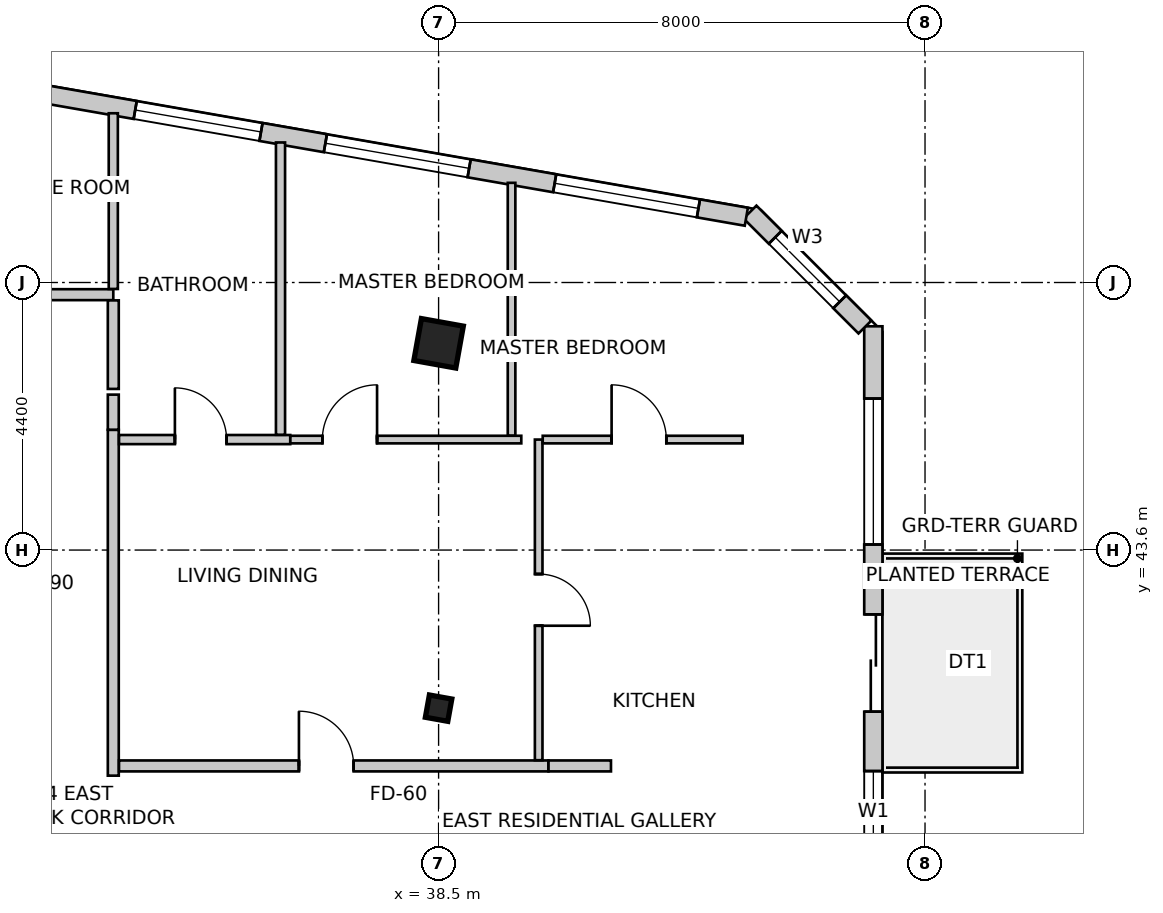
"""IFC4 building model, lengths in metres.
Left out: names, types, materials, properties, quantities, classifications, styles, units other than length and angle.
Written with IfcOpenShell. Run it as: python <this file> out.ifc"""

import sys

from ifc_helpers import new_model, si_unit, direction, frame, frame_2d, origin, origin_2d, place, context, subcontext, project, spatial, rectangle, i_section, extrude, source, transform, mapped, element, fill, save


model = new_model("IFC4")
c1 = context("Model", 3, precision=1e-05, world=origin(), true_north=direction((0.0, 1.0)))
c2 = subcontext(c1, "Body", "Model", "MODEL_VIEW")
j1 = project(units=[si_unit("LENGTHUNIT", "METRE"), si_unit("PLANEANGLEUNIT", "RADIAN")], contexts=[c1])
p1 = place(None, origin())
s1 = spatial("IfcSite", under=j1, at=p1, CompositionType="ELEMENT")
p2 = place(p1, origin())
s2 = spatial("IfcBuilding", under=s1, at=p2, CompositionType="ELEMENT")
p3 = place(p2, frame((0.0, 0.0, 214.9)))
s3 = spatial("IfcBuildingStorey", under=s2, at=p3, CompositionType="ELEMENT", Elevation=214.9)
m1 = source(origin(), c2, "Body", "SweptSolid", [
    extrude(rectangle(XDim=0.7, YDim=0.7, at=origin_2d()), origin(), (0.0, 0.0, 1.0), 3.5),
])
p4 = place(p3, frame((38.5, 47.0, 0.0), z_axis=(0.0, 0.0, 1.0), x_axis=(0.984195607969, -0.17708474032, 0.0)))
e1 = element("IfcColumn", 1, at=p4, inside=s3, PredefinedType="COLUMN", context=c2, shape_type="MappedRepresentation", body=[
    mapped(m1, transform((0.0, 0.0, 0.0), scale=1.0)),
])
m2 = source(origin(), c2, "Body", "SweptSolid", [
    extrude(i_section(OverallWidth=0.374, OverallDepth=0.372, WebThickness=0.016, FlangeThickness=0.026, FilletRadius=0.015, at=origin_2d()), origin(), (0.0, 0.0, 1.0), 3.5),
])
p5 = place(p3, frame((38.5, 41.0, 0.0), z_axis=(0.0, 0.0, 1.0), x_axis=(0.984195607969, -0.17708474032, 0.0)))
e2 = element("IfcColumn", 2, at=p5, inside=s3, PredefinedType="COLUMN", context=c2, shape_type="MappedRepresentation", body=[
    mapped(m2, transform((0.0, 0.0, 0.0), scale=1.0)),
])
p6 = place(p3, frame((45.65, 36.549, 0.0), z_axis=(0.0, 0.0, 1.0), x_axis=(0.0, 1.0, 0.0)))
e3 = element("IfcWall", 3, at=p6, inside=s3, PredefinedType="SOLIDWALL", context=c2, shape_type="SweptSolid", body=[
    extrude(rectangle(XDim=10.73, YDim=0.3, at=frame_2d((5.365, 0.0))), origin(), (0.0, 0.0, 1.0), 3.25),
])
m3 = source(origin(), c2, "Body", "SweptSolid", [
    extrude(rectangle(XDim=1.6, YDim=2.15, at=frame_2d((0.8, 1.075))), frame((0.0, 0.16, 0.0), z_axis=(0.0, -1.0, 0.0), x_axis=(1.0, 0.0, 0.0)), (0.0, 0.0, 1.0), 0.32),
])
p7 = place(p6, frame((4.393, 0.0, 0.0)))
e4 = element("IfcOpeningElement", 4, at=p7, cuts=e3, PredefinedType="OPENING", context=c2, shape_type="MappedRepresentation", body=[
    mapped(m3, transform((0.0, 0.0, 0.0), scale=1.0)),
])
m4 = source(origin(), c2, "Body", "SweptSolid", [
    extrude(rectangle(XDim=2.4, YDim=2.2, at=frame_2d((1.2, 1.1))), frame((0.0, 0.16, 0.0), z_axis=(0.0, -1.0, 0.0), x_axis=(1.0, 0.0, 0.0)), (0.0, 0.0, 1.0), 0.32),
])
p8 = place(p6, frame((1.016, 0.0, 0.85)))
e5 = element("IfcOpeningElement", 5, at=p8, cuts=e3, PredefinedType="OPENING", context=c2, shape_type="MappedRepresentation", body=[
    mapped(m4, transform((0.0, 0.0, 0.0), scale=1.0)),
])
p9 = place(p6, frame((7.142, 0.0, 0.85)))
e6 = element("IfcOpeningElement", 6, at=p9, cuts=e3, PredefinedType="OPENING", context=c2, shape_type="MappedRepresentation", body=[
    mapped(m4, transform((0.0, 0.0, 0.0), scale=1.0)),
])
p10 = place(p3, frame((45.512, 47.268, 0.0), z_axis=(0.0, 0.0, 1.0), x_axis=(-0.707106781187, 0.707106781187, 0.0)))
e7 = element("IfcWall", 7, at=p10, inside=s3, PredefinedType="SOLIDWALL", context=c2, shape_type="SweptSolid", body=[
    extrude(rectangle(XDim=2.674, YDim=0.3, at=frame_2d((1.337, 0.0))), origin(), (0.0, 0.0, 1.0), 3.25),
])
m5 = source(origin(), c2, "Body", "SweptSolid", [
    extrude(rectangle(XDim=1.5, YDim=1.8, at=frame_2d((0.75, 0.9))), frame((0.0, 0.16, 0.0), z_axis=(0.0, -1.0, 0.0), x_axis=(1.0, 0.0, 0.0)), (0.0, 0.0, 1.0), 0.32),
])
p11 = place(p10, frame((0.587, 0.0, 0.85)))
e8 = element("IfcOpeningElement", 8, at=p11, cuts=e7, PredefinedType="OPENING", context=c2, shape_type="MappedRepresentation", body=[
    mapped(m5, transform((0.0, 0.0, 0.0), scale=1.0)),
])
p12 = place(p3, frame((43.561, 49.081, 0.0), z_axis=(0.0, 0.0, 1.0), x_axis=(-0.985083967494, 0.17207433564, 0.0)))
e9 = element("IfcWall", 9, at=p12, inside=s3, PredefinedType="SOLIDWALL", context=c2, shape_type="SweptSolid", body=[
    extrude(rectangle(XDim=22.006, YDim=0.3, at=frame_2d((11.003, 0.0))), origin(), (0.0, 0.0, 1.0), 3.25),
])
p13 = place(p12, frame((0.8, 0.0, 0.85)))
e10 = element("IfcOpeningElement", 10, at=p13, cuts=e9, PredefinedType="OPENING", context=c2, shape_type="MappedRepresentation", body=[
    mapped(m4, transform((0.0, 0.0, 0.0), scale=1.0)),
])
p14 = place(p12, frame((4.628, 0.0, 0.85)))
e11 = element("IfcOpeningElement", 11, at=p14, cuts=e9, PredefinedType="OPENING", context=c2, shape_type="MappedRepresentation", body=[
    mapped(m4, transform((0.0, 0.0, 0.0), scale=1.0)),
])
m6 = source(origin(), c2, "Body", "SweptSolid", [
    extrude(rectangle(XDim=2.1, YDim=2.0, at=frame_2d((1.05, 1.0))), frame((0.0, 0.16, 0.0), z_axis=(0.0, -1.0, 0.0), x_axis=(1.0, 0.0, 0.0)), (0.0, 0.0, 1.0), 0.32),
])
p15 = place(p12, frame((8.103, 0.0, 0.85)))
e12 = element("IfcOpeningElement", 12, at=p15, cuts=e9, PredefinedType="OPENING", context=c2, shape_type="MappedRepresentation", body=[
    mapped(m6, transform((0.0, 0.0, 0.0), scale=1.0)),
])
p16 = place(p12, frame((11.963, 0.0, 0.85)))
e13 = element("IfcOpeningElement", 13, at=p16, cuts=e9, PredefinedType="OPENING", context=c2, shape_type="MappedRepresentation", body=[
    mapped(m4, transform((0.0, 0.0, 0.0), scale=1.0)),
])
p17 = place(p12, frame((16.047, 0.0, 0.85)))
e14 = element("IfcOpeningElement", 14, at=p17, cuts=e9, PredefinedType="OPENING", context=c2, shape_type="MappedRepresentation", body=[
    mapped(m6, transform((0.0, 0.0, 0.0), scale=1.0)),
])
p18 = place(p12, frame((18.961, 0.0, 0.85)))
e15 = element("IfcOpeningElement", 15, at=p18, cuts=e9, PredefinedType="OPENING", context=c2, shape_type="MappedRepresentation", body=[
    mapped(m4, transform((0.0, 0.0, 0.0), scale=1.0)),
])
p19 = place(p3, frame((28.162, 47.8, 0.0), z_axis=(0.0, 0.0, 1.0), x_axis=(1.0, 0.0, 0.0)))
e16 = element("IfcWall", 16, at=p19, inside=s3, PredefinedType="PARTITIONING", context=c2, shape_type="SweptSolid", body=[
    extrude(rectangle(XDim=4.988, YDim=0.18, at=frame_2d((2.494, 0.0))), origin(), (0.0, 0.0, 1.0), 2.688),
])
m7 = source(origin(), c2, "Body", "SweptSolid", [
    extrude(rectangle(XDim=0.85, YDim=2.15, at=frame_2d((0.425, 1.075))), frame((0.0, 0.1, 0.0), z_axis=(0.0, -1.0, 0.0), x_axis=(1.0, 0.0, 0.0)), (0.0, 0.0, 1.0), 0.2),
])
p20 = place(p19, frame((0.403, 0.0, 0.0)))
e17 = element("IfcOpeningElement", 17, at=p20, cuts=e16, PredefinedType="OPENING", context=c2, shape_type="MappedRepresentation", body=[
    mapped(m7, transform((0.0, 0.0, 0.0), scale=1.0)),
])
p21 = place(p3, frame((33.15, 47.706, 0.0), z_axis=(0.0, 0.0, 1.0), x_axis=(0.0, -1.0, 0.0)))
e18 = element("IfcWall", 18, at=p21, inside=s3, PredefinedType="PARTITIONING", context=c2, shape_type="SweptSolid", body=[
    extrude(rectangle(XDim=1.456, YDim=0.18, at=frame_2d((0.728, 0.0))), origin(), (0.0, 0.0, 1.0), 2.835),
])
p22 = place(p3, frame((33.15, 45.577, 0.0), z_axis=(0.0, 0.0, 1.0), x_axis=(0.0, -1.0, 0.0)))
e19 = element("IfcWall", 19, at=p22, inside=s3, PredefinedType="PARTITIONING", context=c2, shape_type="SweptSolid", body=[
    extrude(rectangle(XDim=5.687, YDim=0.18, at=frame_2d((2.844, 0.0))), origin(), (0.0, 0.0, 1.0), 2.688),
])
p23 = place(p3, frame((33.15, 46.156, 0.0), z_axis=(0.0, 0.0, 1.0), x_axis=(0.0, -1.0, 0.0)))
e20 = element("IfcWall", 20, at=p23, inside=s3, PredefinedType="PARTITIONING", context=c2, shape_type="SweptSolid", body=[
    extrude(rectangle(XDim=0.577, YDim=0.18, at=frame_2d((0.289, 0.0))), origin(), (0.0, 0.0, 1.0), 2.688),
])
p24 = place(p3, frame((33.15, 50.783, 0.0), z_axis=(0.0, 0.0, 1.0), x_axis=(0.0, -1.0, 0.0)))
e21 = element("IfcWall", 21, at=p24, inside=s3, PredefinedType="PARTITIONING", context=c2, shape_type="SweptSolid", body=[
    extrude(rectangle(XDim=2.889, YDim=0.15, at=frame_2d((1.445, 0.0))), origin(), (0.0, 0.0, 1.0), 2.542),
])
p25 = place(p3, frame((33.244, 40.05, 0.0), z_axis=(0.0, 0.0, 1.0), x_axis=(1.0, 0.0, 0.0)))
e22 = element("IfcWall", 22, at=p25, inside=s3, PredefinedType="PARTITIONING", context=c2, shape_type="SweptSolid", body=[
    extrude(rectangle(XDim=7.062, YDim=0.18, at=frame_2d((3.531, 0.0))), origin(), (0.0, 0.0, 1.0), 2.766),
])
m8 = source(origin(), c2, "Body", "SweptSolid", [
    extrude(rectangle(XDim=0.9, YDim=2.15, at=frame_2d((0.45, 1.075))), frame((0.0, 0.1, 0.0), z_axis=(0.0, -1.0, 0.0), x_axis=(1.0, 0.0, 0.0)), (0.0, 0.0, 1.0), 0.2),
])
p26 = place(p25, frame((2.959, 0.0, 0.0)))
e23 = element("IfcOpeningElement", 23, at=p26, cuts=e22, PredefinedType="OPENING", context=c2, shape_type="MappedRepresentation", body=[
    mapped(m8, transform((0.0, 0.0, 0.0), scale=1.0)),
])
p27 = place(p3, frame((40.308, 40.05, 0.0), z_axis=(0.0, 0.0, 1.0), x_axis=(1.0, 0.0, 0.0)))
e24 = element("IfcWall", 24, at=p27, inside=s3, PredefinedType="PARTITIONING", context=c2, shape_type="SweptSolid", body=[
    extrude(rectangle(XDim=1.027, YDim=0.18, at=frame_2d((0.513, 0.0))), origin(), (0.0, 0.0, 1.0), 3.25),
])
p28 = place(p3, frame((40.146, 45.417, 0.0), z_axis=(0.0, 0.0, 1.0), x_axis=(0.0, -1.0, 0.0)))
e25 = element("IfcWall", 25, at=p28, inside=s3, PredefinedType="PARTITIONING", context=c2, shape_type="SweptSolid", body=[
    extrude(rectangle(XDim=5.273, YDim=0.125, at=frame_2d((2.636, 0.0))), origin(), (0.0, 0.0, 1.0), 3.25),
])
m9 = source(origin(), c2, "Body", "SweptSolid", [
    extrude(rectangle(XDim=0.85, YDim=2.15, at=frame_2d((0.425, 1.075))), frame((0.0, 0.073, 0.0), z_axis=(0.0, -1.0, 0.0), x_axis=(1.0, 0.0, 0.0)), (0.0, 0.0, 1.0), 0.145),
])
p29 = place(p28, frame((2.211, 0.0, 0.0)))
e26 = element("IfcOpeningElement", 26, at=p29, cuts=e25, PredefinedType="OPENING", context=c2, shape_type="MappedRepresentation", body=[
    mapped(m9, transform((0.0, 0.0, 0.0), scale=1.0)),
])
p30 = place(p3, frame((33.244, 45.417, 0.0), z_axis=(0.0, 0.0, 1.0), x_axis=(1.0, 0.0, 0.0)))
e27 = element("IfcWall", 27, at=p30, inside=s3, PredefinedType="PARTITIONING", context=c2, shape_type="SweptSolid", body=[
    extrude(rectangle(XDim=2.816, YDim=0.15, at=frame_2d((1.408, 0.0))), origin(), (0.0, 0.0, 1.0), 2.835),
])
m10 = source(origin(), c2, "Body", "SweptSolid", [
    extrude(rectangle(XDim=0.85, YDim=2.15, at=frame_2d((0.425, 1.075))), frame((0.0, 0.085, 0.0), z_axis=(0.0, -1.0, 0.0), x_axis=(1.0, 0.0, 0.0)), (0.0, 0.0, 1.0), 0.17),
])
p31 = place(p30, frame((0.919, 0.0, 0.0)))
e28 = element("IfcOpeningElement", 28, at=p31, cuts=e27, PredefinedType="OPENING", context=c2, shape_type="MappedRepresentation", body=[
    mapped(m10, transform((0.0, 0.0, 0.0), scale=1.0)),
])
p32 = place(p3, frame((36.062, 45.417, 0.0), z_axis=(0.0, 0.0, 1.0), x_axis=(1.0, 0.0, 0.0)))
e29 = element("IfcWall", 29, at=p32, inside=s3, PredefinedType="PARTITIONING", context=c2, shape_type="SweptSolid", body=[
    extrude(rectangle(XDim=3.798, YDim=0.125, at=frame_2d((1.899, 0.0))), origin(), (0.0, 0.0, 1.0), 2.766),
])
m11 = source(origin(), c2, "Body", "SweptSolid", [
    extrude(rectangle(XDim=0.9, YDim=2.15, at=frame_2d((0.45, 1.075))), frame((0.0, 0.073, 0.0), z_axis=(0.0, -1.0, 0.0), x_axis=(1.0, 0.0, 0.0)), (0.0, 0.0, 1.0), 0.145),
])
p33 = place(p32, frame((0.526, 0.0, 0.0)))
e30 = element("IfcOpeningElement", 30, at=p33, cuts=e29, PredefinedType="OPENING", context=c2, shape_type="MappedRepresentation", body=[
    mapped(m11, transform((0.0, 0.0, 0.0), scale=1.0)),
])
p34 = place(p3, frame((40.212, 45.417, 0.0), z_axis=(0.0, 0.0, 1.0), x_axis=(1.0, 0.0, 0.0)))
e31 = element("IfcWall", 31, at=p34, inside=s3, PredefinedType="PARTITIONING", context=c2, shape_type="SweptSolid", body=[
    extrude(rectangle(XDim=3.288, YDim=0.125, at=frame_2d((1.644, 0.0))), origin(), (0.0, 0.0, 1.0), 3.25),
])
p35 = place(p34, frame((1.133, 0.0, 0.0)))
e32 = element("IfcOpeningElement", 32, at=p35, cuts=e31, PredefinedType="OPENING", context=c2, shape_type="MappedRepresentation", body=[
    mapped(m11, transform((0.0, 0.0, 0.0), scale=1.0)),
])
p36 = place(p3, frame((35.9, 50.303, 0.0), z_axis=(0.0, 0.0, 1.0), x_axis=(0.0, -1.0, 0.0)))
e33 = element("IfcWall", 33, at=p36, inside=s3, PredefinedType="PARTITIONING", context=c2, shape_type="SweptSolid", body=[
    extrude(rectangle(XDim=4.807, YDim=0.15, at=frame_2d((2.403, 0.0))), origin(), (0.0, 0.0, 1.0), 2.542),
])
p37 = place(p3, frame((39.7, 49.639, 0.0), z_axis=(0.0, 0.0, 1.0), x_axis=(0.0, -1.0, 0.0)))
e34 = element("IfcWall", 34, at=p37, inside=s3, PredefinedType="PARTITIONING", context=c2, shape_type="SweptSolid", body=[
    extrude(rectangle(XDim=4.156, YDim=0.125, at=frame_2d((2.078, 0.0))), origin(), (0.0, 0.0, 1.0), 3.25),
])
m12 = source(origin(), c2, "Body", "SweptSolid", [
    extrude(rectangle(XDim=1.6, YDim=2.15, at=frame_2d((0.8, 1.075))), frame((0.0, 0.025, 0.0), z_axis=(0.0, -1.0, 0.0), x_axis=(1.0, 0.0, 0.0)), (0.0, 0.0, 1.0), 0.05),
])
p38 = place(p7, origin())
e35 = element("IfcDoor", 35, at=p38, inside=s3, OperationType="DOUBLE_DOOR_SLIDING", PredefinedType="DOOR", context=c2, shape_type="MappedRepresentation", body=[
    mapped(m12, transform((0.0, 0.0, 0.0), scale=1.0)),
])
fill(e4, e35)
m13 = source(origin(), c2, "Body", "SweptSolid", [
    extrude(rectangle(XDim=2.4, YDim=2.2, at=frame_2d((1.2, 1.1))), frame((0.0, -0.015, 0.0), z_axis=(0.0, -1.0, 0.0), x_axis=(1.0, 0.0, 0.0)), (0.0, 0.0, 1.0), 0.06),
])
p39 = place(p8, origin())
e36 = element("IfcWindow", 36, at=p39, inside=s3, PartitioningType="SINGLE_PANEL", PredefinedType="WINDOW", context=c2, shape_type="MappedRepresentation", body=[
    mapped(m13, transform((0.0, 0.0, 0.0), scale=1.0)),
])
fill(e5, e36)
p40 = place(p9, origin())
e37 = element("IfcWindow", 37, at=p40, inside=s3, PartitioningType="SINGLE_PANEL", PredefinedType="WINDOW", context=c2, shape_type="MappedRepresentation", body=[
    mapped(m13, transform((0.0, 0.0, 0.0), scale=1.0)),
])
fill(e6, e37)
m14 = source(origin(), c2, "Body", "SweptSolid", [
    extrude(rectangle(XDim=1.5, YDim=1.8, at=frame_2d((0.75, 0.9))), frame((0.0, -0.015, 0.0), z_axis=(0.0, -1.0, 0.0), x_axis=(1.0, 0.0, 0.0)), (0.0, 0.0, 1.0), 0.06),
])
p41 = place(p11, origin())
e38 = element("IfcWindow", 38, at=p41, inside=s3, PartitioningType="SINGLE_PANEL", PredefinedType="WINDOW", context=c2, shape_type="MappedRepresentation", body=[
    mapped(m14, transform((0.0, 0.0, 0.0), scale=1.0)),
])
fill(e8, e38)
p42 = place(p13, origin())
e39 = element("IfcWindow", 39, at=p42, inside=s3, PartitioningType="SINGLE_PANEL", PredefinedType="WINDOW", context=c2, shape_type="MappedRepresentation", body=[
    mapped(m13, transform((0.0, 0.0, 0.0), scale=1.0)),
])
fill(e10, e39)
p43 = place(p14, origin())
e40 = element("IfcWindow", 40, at=p43, inside=s3, PartitioningType="SINGLE_PANEL", PredefinedType="WINDOW", context=c2, shape_type="MappedRepresentation", body=[
    mapped(m13, transform((0.0, 0.0, 0.0), scale=1.0)),
])
fill(e11, e40)
m15 = source(origin(), c2, "Body", "SweptSolid", [
    extrude(rectangle(XDim=2.1, YDim=2.0, at=frame_2d((1.05, 1.0))), frame((0.0, -0.015, 0.0), z_axis=(0.0, -1.0, 0.0), x_axis=(1.0, 0.0, 0.0)), (0.0, 0.0, 1.0), 0.06),
])
p44 = place(p15, origin())
e41 = element("IfcWindow", 41, at=p44, inside=s3, PartitioningType="SINGLE_PANEL", PredefinedType="WINDOW", context=c2, shape_type="MappedRepresentation", body=[
    mapped(m15, transform((0.0, 0.0, 0.0), scale=1.0)),
])
fill(e12, e41)
m16 = source(origin(), c2, "Body", "SweptSolid", [
    extrude(rectangle(XDim=0.9, YDim=2.15, at=frame_2d((0.45, 1.075))), frame((0.0, 0.025, 0.0), z_axis=(0.0, -1.0, 0.0), x_axis=(1.0, 0.0, 0.0)), (0.0, 0.0, 1.0), 0.05),
])
p45 = place(p26, origin())
e42 = element("IfcDoor", 42, at=p45, inside=s3, OperationType="SINGLE_SWING_LEFT", PredefinedType="DOOR", context=c2, shape_type="MappedRepresentation", body=[
    mapped(m16, transform((0.0, 0.0, 0.0), scale=1.0)),
])
fill(e23, e42)
m17 = source(origin(), c2, "Body", "SweptSolid", [
    extrude(rectangle(XDim=0.85, YDim=2.15, at=frame_2d((0.425, 1.075))), frame((0.0, 0.025, 0.0), z_axis=(0.0, -1.0, 0.0), x_axis=(1.0, 0.0, 0.0)), (0.0, 0.0, 1.0), 0.05),
])
p46 = place(p29, origin())
e43 = element("IfcDoor", 43, at=p46, inside=s3, OperationType="SINGLE_SWING_RIGHT", PredefinedType="DOOR", context=c2, shape_type="MappedRepresentation", body=[
    mapped(m17, transform((0.0, 0.0, 0.0), scale=1.0)),
])
fill(e26, e43)
p47 = place(p31, origin())
e44 = element("IfcDoor", 44, at=p47, inside=s3, OperationType="SINGLE_SWING_LEFT", PredefinedType="DOOR", context=c2, shape_type="MappedRepresentation", body=[
    mapped(m17, transform((0.0, 0.0, 0.0), scale=1.0)),
])
fill(e28, e44)
m18 = source(origin(), c2, "Body", "SweptSolid", [
    extrude(rectangle(XDim=0.9, YDim=2.15, at=frame_2d((0.45, 1.075))), frame((0.0, 0.025, 0.0), z_axis=(0.0, -1.0, 0.0), x_axis=(1.0, 0.0, 0.0)), (0.0, 0.0, 1.0), 0.05),
])
p48 = place(p33, origin())
e45 = element("IfcDoor", 45, at=p48, inside=s3, OperationType="SINGLE_SWING_RIGHT", PredefinedType="DOOR", context=c2, shape_type="MappedRepresentation", body=[
    mapped(m18, transform((0.0, 0.0, 0.0), scale=1.0)),
])
fill(e30, e45)
p49 = place(p35, origin())
e46 = element("IfcDoor", 46, at=p49, inside=s3, OperationType="SINGLE_SWING_LEFT", PredefinedType="DOOR", context=c2, shape_type="MappedRepresentation", body=[
    mapped(m18, transform((0.0, 0.0, 0.0), scale=1.0)),
])
fill(e32, e46)
save(model, sys.argv[1])
